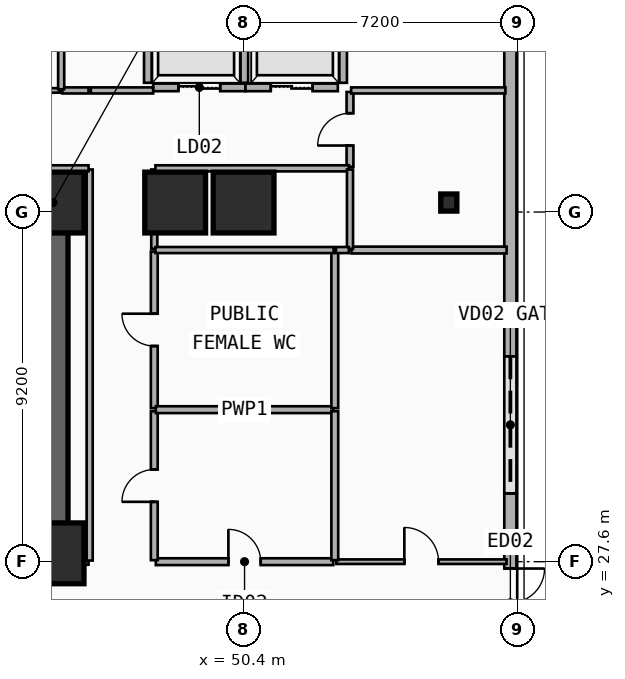
"""IFC4 building model, lengths in metres.
Left out: names, types, materials, properties, quantities, classifications, styles, units other than length and angle.
Written with IfcOpenShell. Run it as: python <this file> out.ifc"""

import sys

from ifc_helpers import new_model, si_unit, direction, frame, frame_2d, origin, origin_2d, place, context, subcontext, project, spatial, rectangle, i_section, extrude, element, fill, save


model = new_model("IFC4")
c1 = context("Model", 3, precision=1e-05, world=origin(), true_north=direction((0.0, 1.0)))
c2 = subcontext(c1, "Body", "Model", "MODEL_VIEW")
j1 = project(units=[si_unit("LENGTHUNIT", "METRE"), si_unit("PLANEANGLEUNIT", "RADIAN")], contexts=[c1])
p1 = place(None, origin())
s1 = spatial("IfcSite", under=j1, at=p1, CompositionType="ELEMENT")
p2 = place(p1, origin())
s2 = spatial("IfcBuilding", under=s1, at=p2, CompositionType="ELEMENT")
p3 = place(p2, origin())
s3 = spatial("IfcBuildingStorey", under=s2, at=p3, CompositionType="ELEMENT", Elevation=0.0)
p4 = place(p3, frame((12.15, 37.05, 0.0), z_axis=(0.0, 0.0, 1.0), x_axis=(1.0, 0.0, 0.0)))
e1 = element("IfcWall", 1, at=p4, inside=s3, PredefinedType="SHEAR", context=c2, shape_type="SweptSolid", body=[
    extrude(rectangle(XDim=33.23, YDim=0.8, at=frame_2d((16.615, 0.0))), origin(), (0.0, 0.0, 1.0), 5.4),
])
p5 = place(p3, frame((45.38, 27.82, 0.0), z_axis=(0.0, 0.0, 1.0), x_axis=(-1.0, 0.0, 0.0)))
e2 = element("IfcWall", 2, at=p5, inside=s3, PredefinedType="SHEAR", context=c2, shape_type="SweptSolid", body=[
    extrude(rectangle(XDim=12.23, YDim=0.8, at=frame_2d((6.115, 0.0))), origin(), (0.0, 0.0, 1.0), 5.4),
])
p6 = place(p5, frame((9.93, 0.0, 0.0)))
e3 = element("IfcOpeningElement", 3, at=p6, cuts=e2, PredefinedType="OPENING", context=c2, shape_type="SweptSolid", body=[
    extrude(rectangle(XDim=1.1, YDim=2.15, at=frame_2d((0.55, 1.075))), frame((0.0, 0.41, 0.0), z_axis=(0.0, -1.0, 0.0), x_axis=(1.0, 0.0, 0.0)), (0.0, 0.0, 1.0), 0.82),
])
p7 = place(p5, frame((6.23, 0.0, 0.0)))
e4 = element("IfcOpeningElement", 4, at=p7, cuts=e2, PredefinedType="OPENING", context=c2, shape_type="SweptSolid", body=[
    extrude(rectangle(XDim=1.1, YDim=2.15, at=frame_2d((0.55, 1.075))), frame((0.0, 0.41, 0.0), z_axis=(0.0, -1.0, 0.0), x_axis=(1.0, 0.0, 0.0)), (0.0, 0.0, 1.0), 0.82),
])
p8 = place(p3, frame((45.38, 28.22, 0.0), z_axis=(0.0, 0.0, 1.0), x_axis=(0.0, 1.0, 0.0)))
e5 = element("IfcWall", 5, at=p8, inside=s3, PredefinedType="SHEAR", context=c2, shape_type="SweptSolid", body=[
    extrude(rectangle(XDim=8.43, YDim=0.8, at=frame_2d((4.215, 0.0))), origin(), (0.0, 0.0, 1.0), 5.4),
])
for number, where, z_axis, x_axis in (
    (6, (45.4, 27.82, 0.0), (0.0, 0.0, 1.0), (1.0, 0.0, 0.0)),
    (7, (45.4, 37.05, 0.0), (0.0, 0.0, 1.0), (1.0, 0.0, 0.0)),
    (8, (48.6, 37.05, 0.0), (0.0, 0.0, 1.0), (1.0, 0.0, 0.0)),
    (9, (50.4, 37.05, 0.0), (0.0, 0.0, 1.0), (1.0, 0.0, 0.0)),
):
    element("IfcColumn", number, at=place(p3, frame(where, z_axis=z_axis, x_axis=x_axis)), inside=s3, PredefinedType="COLUMN", context=c2, shape_type="SweptSolid", body=[
        extrude(rectangle(XDim=1.6, YDim=1.6, at=origin_2d()), origin(), (0.0, 0.0, 1.0), 5.4),
    ])
p9 = place(p3, frame((55.8, 37.05, 0.0), z_axis=(0.0, 0.0, 1.0), x_axis=(1.0, 0.0, 0.0)))
e10 = element("IfcColumn", 10, at=p9, inside=s3, PredefinedType="COLUMN", context=c2, shape_type="SweptSolid", body=[
    extrude(i_section(OverallWidth=0.424, OverallDepth=0.45, WebThickness=0.041, FlangeThickness=0.065, FilletRadius=0.015, at=origin_2d()), origin(), (0.0, 0.0, 1.0), 5.4),
])
p10 = place(p3, frame((57.42, 41.6, 0.0), z_axis=(0.0, 0.0, 1.0), x_axis=(0.0, -1.0, 0.0)))
e11 = element("IfcWall", 11, at=p10, inside=s3, PredefinedType="SOLIDWALL", context=c2, shape_type="SweptSolid", body=[
    extrude(rectangle(XDim=34.4, YDim=0.32, at=frame_2d((17.2, 0.0))), origin(), (0.0, 0.0, 1.0), 5.1),
])
p11 = place(p10, frame((14.18, 0.0, 0.0)))
e12 = element("IfcOpeningElement", 12, at=p11, cuts=e11, PredefinedType="OPENING", context=c2, shape_type="SweptSolid", body=[
    extrude(rectangle(XDim=1.8, YDim=2.3, at=frame_2d((0.9, 1.15))), frame((0.0, 0.17, 0.0), z_axis=(0.0, -1.0, 0.0), x_axis=(1.0, 0.0, 0.0)), (0.0, 0.0, 1.0), 0.34),
])
p12 = place(p10, frame((21.2, 0.0, 0.0)))
e13 = element("IfcOpeningElement", 13, at=p12, cuts=e11, PredefinedType="OPENING", context=c2, shape_type="SweptSolid", body=[
    extrude(rectangle(XDim=2.2, YDim=2.4, at=frame_2d((1.1, 1.2))), frame((0.0, 0.17, 0.0), z_axis=(0.0, -1.0, 0.0), x_axis=(1.0, 0.0, 0.0)), (0.0, 0.0, 1.0), 0.34),
])
p13 = place(p10, frame((8.6, 0.0, 0.0)))
e14 = element("IfcOpeningElement", 14, at=p13, cuts=e11, PredefinedType="OPENING", context=c2, shape_type="SweptSolid", body=[
    extrude(rectangle(XDim=3.6, YDim=3.2, at=frame_2d((1.8, 1.6))), frame((0.0, 0.17, 0.0), z_axis=(0.0, -1.0, 0.0), x_axis=(1.0, 0.0, 0.0)), (0.0, 0.0, 1.0), 0.34),
])
p14 = place(p3, frame((48.02, 40.08, 0.0), z_axis=(0.0, 0.0, 1.0), x_axis=(1.0, 0.0, 0.0)))
e15 = element("IfcWall", 15, at=p14, inside=s3, PredefinedType="PARTITIONING", context=c2, shape_type="SweptSolid", body=[
    extrude(rectangle(XDim=2.43, YDim=0.2, at=frame_2d((1.215, 0.0))), origin(), (0.0, 0.0, 1.0), 5.1),
])
p15 = place(p14, frame((0.665, 0.0, 0.0)))
e16 = element("IfcOpeningElement", 16, at=p15, cuts=e15, PredefinedType="OPENING", context=c2, shape_type="SweptSolid", body=[
    extrude(rectangle(XDim=1.1, YDim=2.15, at=frame_2d((0.55, 1.075))), frame((0.0, 0.11, 0.0), z_axis=(0.0, -1.0, 0.0), x_axis=(1.0, 0.0, 0.0)), (0.0, 0.0, 1.0), 0.22),
])
for number, where, z_axis, x_axis in (
    (17, (47.88, 40.2, 0.0), (0.0, 0.0, 1.0), (0.0, 1.0, 0.0)),
    (18, (50.42, 40.2, 0.0), (0.0, 0.0, 1.0), (0.0, 1.0, 0.0)),
):
    element("IfcWall", number, at=place(p3, frame(where, z_axis=z_axis, x_axis=x_axis)), inside=s3, PredefinedType="PARTITIONING", context=c2, shape_type="SweptSolid", body=[
        extrude(rectangle(XDim=2.6, YDim=0.2, at=frame_2d((1.3, 0.0))), origin(), (0.0, 0.0, 1.0), 5.1),
    ])
p16 = place(p3, frame((50.45, 40.08, 0.0), z_axis=(0.0, 0.0, 1.0), x_axis=(1.0, 0.0, 0.0)))
e19 = element("IfcWall", 19, at=p16, inside=s3, PredefinedType="PARTITIONING", context=c2, shape_type="SweptSolid", body=[
    extrude(rectangle(XDim=2.43, YDim=0.2, at=frame_2d((1.215, 0.0))), origin(), (0.0, 0.0, 1.0), 5.1),
])
p17 = place(p16, frame((0.665, 0.0, 0.0)))
e20 = element("IfcOpeningElement", 20, at=p17, cuts=e19, PredefinedType="OPENING", context=c2, shape_type="SweptSolid", body=[
    extrude(rectangle(XDim=1.1, YDim=2.15, at=frame_2d((0.55, 1.075))), frame((0.0, 0.11, 0.0), z_axis=(0.0, -1.0, 0.0), x_axis=(1.0, 0.0, 0.0)), (0.0, 0.0, 1.0), 0.22),
])
p18 = place(p3, frame((53.02, 40.2, 0.0), z_axis=(0.0, 0.0, 1.0), x_axis=(0.0, 1.0, 0.0)))
e21 = element("IfcWall", 21, at=p18, inside=s3, PredefinedType="PARTITIONING", context=c2, shape_type="SweptSolid", body=[
    extrude(rectangle(XDim=2.6, YDim=0.2, at=frame_2d((1.3, 0.0))), origin(), (0.0, 0.0, 1.0), 5.1),
])
p19 = place(p3, frame((48.09, 27.6, 0.0), z_axis=(0.0, 0.0, 1.0), x_axis=(1.0, 0.0, 0.0)))
e22 = element("IfcWall", 22, at=p19, inside=s3, PredefinedType="PLUMBINGWALL", context=c2, shape_type="SweptSolid", body=[
    extrude(rectangle(XDim=4.67, YDim=0.18, at=frame_2d((2.335, 0.0))), origin(), (0.0, 0.0, 1.0), 5.1),
])
p20 = place(p19, frame((1.91, 0.0, 0.0)))
e23 = element("IfcOpeningElement", 23, at=p20, cuts=e22, PredefinedType="OPENING", context=c2, shape_type="SweptSolid", body=[
    extrude(rectangle(XDim=0.85, YDim=2.1, at=frame_2d((0.425, 1.05))), frame((0.0, 0.1, 0.0), z_axis=(0.0, -1.0, 0.0), x_axis=(1.0, 0.0, 0.0)), (0.0, 0.0, 1.0), 0.2),
])
p21 = place(p3, frame((52.84, 27.6, 0.0), z_axis=(0.0, 0.0, 1.0), x_axis=(1.0, 0.0, 0.0)))
e24 = element("IfcWall", 24, at=p21, inside=s3, PredefinedType="PARTITIONING", context=c2, shape_type="SweptSolid", body=[
    extrude(rectangle(XDim=4.48, YDim=0.12, at=frame_2d((2.24, 0.0))), origin(), (0.0, 0.0, 1.0), 5.1),
])
p22 = place(p21, frame((1.79, 0.0, 0.0)))
e25 = element("IfcOpeningElement", 25, at=p22, cuts=e24, PredefinedType="OPENING", context=c2, shape_type="SweptSolid", body=[
    extrude(rectangle(XDim=0.9, YDim=2.1, at=frame_2d((0.45, 1.05))), frame((0.0, 0.07, 0.0), z_axis=(0.0, -1.0, 0.0), x_axis=(1.0, 0.0, 0.0)), (0.0, 0.0, 1.0), 0.14),
])
p23 = place(p3, frame((48.05, 27.64, 0.0), z_axis=(0.0, 0.0, 1.0), x_axis=(0.0, 1.0, 0.0)))
e26 = element("IfcWall", 26, at=p23, inside=s3, PredefinedType="PLUMBINGWALL", context=c2, shape_type="SweptSolid", body=[
    extrude(rectangle(XDim=3.92, YDim=0.18, at=frame_2d((1.96, 0.0))), origin(), (0.0, 0.0, 1.0), 5.1),
])
p24 = place(p23, frame((1.535, 0.0, 0.0)))
e27 = element("IfcOpeningElement", 27, at=p24, cuts=e26, PredefinedType="OPENING", context=c2, shape_type="SweptSolid", body=[
    extrude(rectangle(XDim=0.85, YDim=2.1, at=frame_2d((0.425, 1.05))), frame((0.0, 0.1, 0.0), z_axis=(0.0, -1.0, 0.0), x_axis=(1.0, 0.0, 0.0)), (0.0, 0.0, 1.0), 0.2),
])
p25 = place(p3, frame((48.05, 31.64, 0.0), z_axis=(0.0, 0.0, 1.0), x_axis=(0.0, 1.0, 0.0)))
e28 = element("IfcWall", 28, at=p25, inside=s3, PredefinedType="PLUMBINGWALL", context=c2, shape_type="SweptSolid", body=[
    extrude(rectangle(XDim=4.12, YDim=0.18, at=frame_2d((2.06, 0.0))), origin(), (0.0, 0.0, 1.0), 5.1),
])
p26 = place(p25, frame((1.635, 0.0, 0.0)))
e29 = element("IfcOpeningElement", 29, at=p26, cuts=e28, PredefinedType="OPENING", context=c2, shape_type="SweptSolid", body=[
    extrude(rectangle(XDim=0.85, YDim=2.1, at=frame_2d((0.425, 1.05))), frame((0.0, 0.1, 0.0), z_axis=(0.0, -1.0, 0.0), x_axis=(1.0, 0.0, 0.0)), (0.0, 0.0, 1.0), 0.2),
])
p27 = place(p3, frame((36.24, 40.0, 0.0), z_axis=(0.0, 0.0, 1.0), x_axis=(1.0, 0.0, 0.0)))
e30 = element("IfcWall", 30, at=p27, inside=s3, PredefinedType="PARTITIONING", context=c2, shape_type="SweptSolid", body=[
    extrude(rectangle(XDim=9.32, YDim=0.12, at=frame_2d((4.66, 0.0))), origin(), (0.0, 0.0, 1.0), 4.43),
])
p28 = place(p27, frame((4.21, 0.0, 0.0)))
e31 = element("IfcOpeningElement", 31, at=p28, cuts=e30, PredefinedType="OPENING", context=c2, shape_type="SweptSolid", body=[
    extrude(rectangle(XDim=0.9, YDim=2.1, at=frame_2d((0.45, 1.05))), frame((0.0, 0.07, 0.0), z_axis=(0.0, -1.0, 0.0), x_axis=(1.0, 0.0, 0.0)), (0.0, 0.0, 1.0), 0.14),
])
p29 = place(p3, frame((53.2, 37.99, 0.0), z_axis=(0.0, 0.0, 1.0), x_axis=(0.0, 1.0, 0.0)))
e32 = element("IfcWall", 32, at=p29, inside=s3, PredefinedType="PLUMBINGWALL", context=c2, shape_type="SweptSolid", body=[
    extrude(rectangle(XDim=1.97, YDim=0.18, at=frame_2d((0.985, 0.0))), origin(), (0.0, 0.0, 1.0), 5.1),
])
p30 = place(p29, frame((0.56, 0.0, 0.0)))
e33 = element("IfcOpeningElement", 33, at=p30, cuts=e32, PredefinedType="OPENING", context=c2, shape_type="SweptSolid", body=[
    extrude(rectangle(XDim=0.85, YDim=2.1, at=frame_2d((0.425, 1.05))), frame((0.0, 0.1, 0.0), z_axis=(0.0, -1.0, 0.0), x_axis=(1.0, 0.0, 0.0)), (0.0, 0.0, 1.0), 0.2),
])
p31 = place(p3, frame((48.09, 31.6, 0.0), z_axis=(0.0, 0.0, 1.0), x_axis=(1.0, 0.0, 0.0)))
e34 = element("IfcWall", 34, at=p31, inside=s3, PredefinedType="PLUMBINGWALL", context=c2, shape_type="SweptSolid", body=[
    extrude(rectangle(XDim=4.67, YDim=0.18, at=frame_2d((2.335, 0.0))), origin(), (0.0, 0.0, 1.0), 5.1),
])
p32 = place(p3, frame((52.8, 27.64, 0.0), z_axis=(0.0, 0.0, 1.0), x_axis=(0.0, 1.0, 0.0)))
e35 = element("IfcWall", 35, at=p32, inside=s3, PredefinedType="PLUMBINGWALL", context=c2, shape_type="SweptSolid", body=[
    extrude(rectangle(XDim=3.92, YDim=0.18, at=frame_2d((1.96, 0.0))), origin(), (0.0, 0.0, 1.0), 5.1),
])
p33 = place(p3, frame((52.8, 31.64, 0.0), z_axis=(0.0, 0.0, 1.0), x_axis=(0.0, 1.0, 0.0)))
e36 = element("IfcWall", 36, at=p33, inside=s3, PredefinedType="PLUMBINGWALL", context=c2, shape_type="SweptSolid", body=[
    extrude(rectangle(XDim=4.12, YDim=0.18, at=frame_2d((2.06, 0.0))), origin(), (0.0, 0.0, 1.0), 5.1),
])
p34 = place(p3, frame((53.24, 35.8, 0.0), z_axis=(0.0, 0.0, 1.0), x_axis=(1.0, 0.0, 0.0)))
e37 = element("IfcWall", 37, at=p34, inside=s3, PredefinedType="PLUMBINGWALL", context=c2, shape_type="SweptSolid", body=[
    extrude(rectangle(XDim=4.08, YDim=0.18, at=frame_2d((2.04, 0.0))), origin(), (0.0, 0.0, 1.0), 5.1),
])
p35 = place(p3, frame((45.41, 27.6, 0.0), z_axis=(0.0, 0.0, 1.0), x_axis=(1.0, 0.0, 0.0)))
e38 = element("IfcWall", 38, at=p35, inside=s3, PredefinedType="PARTITIONING", context=c2, shape_type="SweptSolid", body=[
    extrude(rectangle(XDim=0.91, YDim=0.16, at=frame_2d((0.455, 0.0))), origin(), (0.0, 0.0, 1.0), 4.072),
])
p36 = place(p3, frame((46.38, 40.0, 0.0), z_axis=(0.0, 0.0, 1.0), x_axis=(1.0, 0.0, 0.0)))
e39 = element("IfcWall", 39, at=p36, inside=s3, PredefinedType="PARTITIONING", context=c2, shape_type="SweptSolid", body=[
    extrude(rectangle(XDim=1.64, YDim=0.16, at=frame_2d((0.82, 0.0))), origin(), (0.0, 0.0, 1.0), 5.1),
])
p37 = place(p3, frame((46.35, 27.63, 0.0), z_axis=(0.0, 0.0, 1.0), x_axis=(0.0, 1.0, 0.0)))
e40 = element("IfcWall", 40, at=p37, inside=s3, PredefinedType="PARTITIONING", context=c2, shape_type="SweptSolid", body=[
    extrude(rectangle(XDim=10.29, YDim=0.16, at=frame_2d((5.145, 0.0))), origin(), (0.0, 0.0, 1.0), 5.1),
])
p38 = place(p3, frame((48.05, 35.83, 0.0), z_axis=(0.0, 0.0, 1.0), x_axis=(0.0, 1.0, 0.0)))
e41 = element("IfcWall", 41, at=p38, inside=s3, PredefinedType="PARTITIONING", context=c2, shape_type="SweptSolid", body=[
    extrude(rectangle(XDim=2.09, YDim=0.16, at=frame_2d((1.045, 0.0))), origin(), (0.0, 0.0, 1.0), 5.1),
])
p39 = place(p3, frame((11.28, 37.95, 0.0), z_axis=(0.0, 0.0, 1.0), x_axis=(1.0, 0.0, 0.0)))
e42 = element("IfcWall", 42, at=p39, inside=s3, PredefinedType="PARTITIONING", context=c2, shape_type="SweptSolid", body=[
    extrude(rectangle(XDim=35.04, YDim=0.16, at=frame_2d((17.52, 0.0))), origin(), (0.0, 0.0, 1.0), 4.43),
])
p40 = place(p3, frame((45.63, 40.0, 0.0), z_axis=(0.0, 0.0, 1.0), x_axis=(1.0, 0.0, 0.0)))
e43 = element("IfcWall", 43, at=p40, inside=s3, PredefinedType="PARTITIONING", context=c2, shape_type="SweptSolid", body=[
    extrude(rectangle(XDim=0.69, YDim=0.16, at=frame_2d((0.345, 0.0))), origin(), (0.0, 0.0, 1.0), 4.43),
])
p41 = place(p3, frame((48.08, 37.95, 0.0), z_axis=(0.0, 0.0, 1.0), x_axis=(1.0, 0.0, 0.0)))
e44 = element("IfcWall", 44, at=p41, inside=s3, PredefinedType="PARTITIONING", context=c2, shape_type="SweptSolid", body=[
    extrude(rectangle(XDim=5.09, YDim=0.16, at=frame_2d((2.545, 0.0))), origin(), (0.0, 0.0, 1.0), 5.1),
])
p42 = place(p3, frame((48.08, 35.8, 0.0), z_axis=(0.0, 0.0, 1.0), x_axis=(1.0, 0.0, 0.0)))
e45 = element("IfcWall", 45, at=p42, inside=s3, PredefinedType="PARTITIONING", context=c2, shape_type="SweptSolid", body=[
    extrude(rectangle(XDim=4.69, YDim=0.16, at=frame_2d((2.345, 0.0))), origin(), (0.0, 0.0, 1.0), 5.1),
])
p43 = place(p3, frame((53.23, 40.0, 0.0), z_axis=(0.0, 0.0, 1.0), x_axis=(1.0, 0.0, 0.0)))
e46 = element("IfcWall", 46, at=p43, inside=s3, PredefinedType="PARTITIONING", context=c2, shape_type="SweptSolid", body=[
    extrude(rectangle(XDim=4.06, YDim=0.16, at=frame_2d((2.03, 0.0))), origin(), (0.0, 0.0, 1.0), 5.1),
])
p44 = place(p3, frame((53.2, 35.83, 0.0), z_axis=(0.0, 0.0, 1.0), x_axis=(0.0, 1.0, 0.0)))
e47 = element("IfcWall", 47, at=p44, inside=s3, PredefinedType="PARTITIONING", context=c2, shape_type="SweptSolid", body=[
    extrude(rectangle(XDim=2.09, YDim=0.16, at=frame_2d((1.045, 0.0))), origin(), (0.0, 0.0, 1.0), 5.1),
])
p45 = place(p3, frame((52.83, 35.8, 0.0), z_axis=(0.0, 0.0, 1.0), x_axis=(1.0, 0.0, 0.0)))
e48 = element("IfcWall", 48, at=p45, inside=s3, PredefinedType="PARTITIONING", context=c2, shape_type="SweptSolid", body=[
    extrude(rectangle(XDim=0.34, YDim=0.16, at=frame_2d((0.17, 0.0))), origin(), (0.0, 0.0, 1.0), 5.1),
])
p46 = place(p3, frame((45.6, 40.03, 0.0), z_axis=(0.0, 0.0, 1.0), x_axis=(0.0, 1.0, 0.0)))
e49 = element("IfcWall", 49, at=p46, inside=s3, PredefinedType="PARTITIONING", context=c2, shape_type="SweptSolid", body=[
    extrude(rectangle(XDim=4.86, YDim=0.16, at=frame_2d((2.43, 0.0))), origin(), (0.0, 0.0, 1.0), 4.43),
])
p47 = place(p11, origin())
e50 = element("IfcDoor", 50, at=p47, inside=s3, OperationType="SINGLE_SWING_LEFT", PredefinedType="DOOR", context=c2, shape_type="SweptSolid", body=[
    extrude(rectangle(XDim=1.8, YDim=2.3, at=frame_2d((0.9, 1.15))), frame((0.0, 0.025, 0.0), z_axis=(0.0, -1.0, 0.0), x_axis=(1.0, 0.0, 0.0)), (0.0, 0.0, 1.0), 0.05),
])
fill(e12, e50)
p48 = place(p13, origin())
e51 = element("IfcDoor", 51, at=p48, inside=s3, OperationType="ROLLINGUP", PredefinedType="GATE", context=c2, shape_type="SweptSolid", body=[
    extrude(rectangle(XDim=3.6, YDim=3.2, at=frame_2d((1.8, 1.6))), frame((0.0, 0.025, 0.0), z_axis=(0.0, -1.0, 0.0), x_axis=(1.0, 0.0, 0.0)), (0.0, 0.0, 1.0), 0.05),
])
fill(e14, e51)
p49 = place(p15, origin())
e52 = element("IfcDoor", 52, at=p49, inside=s3, OperationType="DOUBLE_DOOR_SLIDING", PredefinedType="DOOR", context=c2, shape_type="SweptSolid", body=[
    extrude(rectangle(XDim=1.1, YDim=2.15, at=frame_2d((0.55, 1.075))), frame((0.0, 0.025, 0.0), z_axis=(0.0, -1.0, 0.0), x_axis=(1.0, 0.0, 0.0)), (0.0, 0.0, 1.0), 0.05),
])
fill(e16, e52)
p50 = place(p17, origin())
e53 = element("IfcDoor", 53, at=p50, inside=s3, OperationType="DOUBLE_DOOR_SLIDING", PredefinedType="DOOR", context=c2, shape_type="SweptSolid", body=[
    extrude(rectangle(XDim=1.1, YDim=2.15, at=frame_2d((0.55, 1.075))), frame((0.0, 0.025, 0.0), z_axis=(0.0, -1.0, 0.0), x_axis=(1.0, 0.0, 0.0)), (0.0, 0.0, 1.0), 0.05),
])
fill(e20, e53)
p51 = place(p20, origin())
e54 = element("IfcDoor", 54, at=p51, inside=s3, OperationType="SINGLE_SWING_LEFT", PredefinedType="DOOR", context=c2, shape_type="SweptSolid", body=[
    extrude(rectangle(XDim=0.85, YDim=2.1, at=frame_2d((0.425, 1.05))), frame((0.0, 0.025, 0.0), z_axis=(0.0, -1.0, 0.0), x_axis=(1.0, 0.0, 0.0)), (0.0, 0.0, 1.0), 0.05),
])
fill(e23, e54)
p52 = place(p22, origin())
e55 = element("IfcDoor", 55, at=p52, inside=s3, OperationType="SINGLE_SWING_LEFT", PredefinedType="DOOR", context=c2, shape_type="SweptSolid", body=[
    extrude(rectangle(XDim=0.9, YDim=2.1, at=frame_2d((0.45, 1.05))), frame((0.0, 0.025, 0.0), z_axis=(0.0, -1.0, 0.0), x_axis=(1.0, 0.0, 0.0)), (0.0, 0.0, 1.0), 0.05),
])
fill(e25, e55)
p53 = place(p24, origin())
e56 = element("IfcDoor", 56, at=p53, inside=s3, OperationType="SINGLE_SWING_LEFT", PredefinedType="DOOR", context=c2, shape_type="SweptSolid", body=[
    extrude(rectangle(XDim=0.85, YDim=2.1, at=frame_2d((0.425, 1.05))), frame((0.0, 0.025, 0.0), z_axis=(0.0, -1.0, 0.0), x_axis=(1.0, 0.0, 0.0)), (0.0, 0.0, 1.0), 0.05),
])
fill(e27, e56)
p54 = place(p26, origin())
e57 = element("IfcDoor", 57, at=p54, inside=s3, OperationType="SINGLE_SWING_RIGHT", PredefinedType="DOOR", context=c2, shape_type="SweptSolid", body=[
    extrude(rectangle(XDim=0.85, YDim=2.1, at=frame_2d((0.425, 1.05))), frame((0.0, 0.025, 0.0), z_axis=(0.0, -1.0, 0.0), x_axis=(1.0, 0.0, 0.0)), (0.0, 0.0, 1.0), 0.05),
])
fill(e29, e57)
p55 = place(p30, origin())
e58 = element("IfcDoor", 58, at=p55, inside=s3, OperationType="SINGLE_SWING_LEFT", PredefinedType="DOOR", context=c2, shape_type="SweptSolid", body=[
    extrude(rectangle(XDim=0.85, YDim=2.1, at=frame_2d((0.425, 1.05))), frame((0.0, 0.025, 0.0), z_axis=(0.0, -1.0, 0.0), x_axis=(1.0, 0.0, 0.0)), (0.0, 0.0, 1.0), 0.05),
])
fill(e33, e58)
save(model, sys.argv[1])
